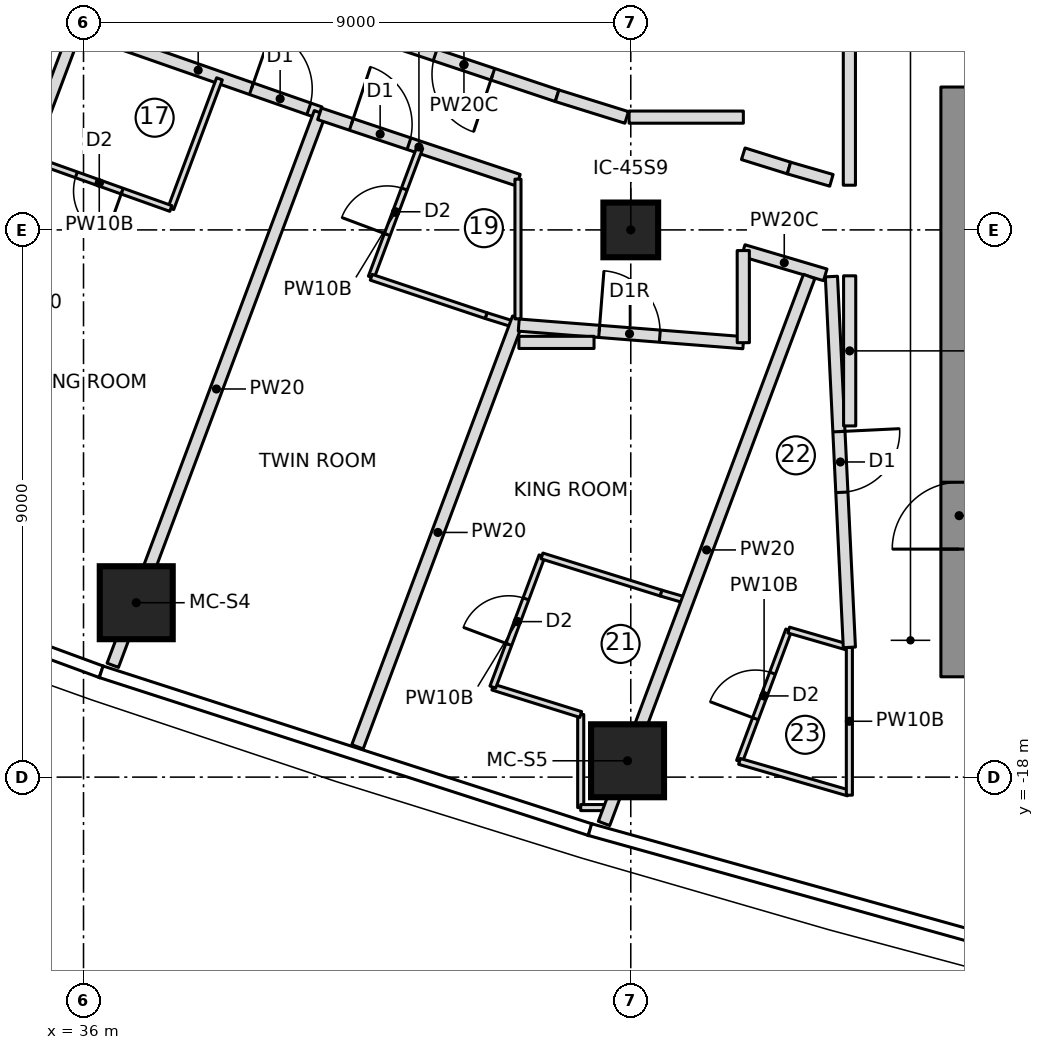
"""IFC4 building model, lengths in metres.
Left out: names, types, materials, properties, quantities, classifications, styles, units other than length and angle.
Written with IfcOpenShell. Run it as: python <this file> out.ifc"""

import sys

from ifc_helpers import new_model, si_unit, direction, frame, frame_2d, origin, origin_2d, place, context, subcontext, project, spatial, rectangle, extrude, element, fill, save


model = new_model("IFC4")
c1 = context("Model", 3, precision=1e-05, world=origin(), true_north=direction((0.0, 1.0)))
c2 = subcontext(c1, "Body", "Model", "MODEL_VIEW")
j1 = project(units=[si_unit("LENGTHUNIT", "METRE"), si_unit("PLANEANGLEUNIT", "RADIAN")], contexts=[c1])
p1 = place(None, origin())
s1 = spatial("IfcSite", under=j1, at=p1, CompositionType="ELEMENT")
p2 = place(p1, origin())
s2 = spatial("IfcBuilding", under=s1, at=p2, CompositionType="ELEMENT")
p3 = place(p2, frame((0.0, 0.0, 249.2)))
s3 = spatial("IfcBuildingStorey", under=s2, at=p3, CompositionType="ELEMENT", Elevation=249.2)
p4 = place(p3, frame((50.4, -16.35, 0.0), z_axis=(0.0, 0.0, 1.0), x_axis=(0.0, 1.0, 0.0)))
e1 = element("IfcWall", 1, at=p4, inside=s3, PredefinedType="SHEAR", context=c2, shape_type="SweptSolid", body=[
    extrude(rectangle(XDim=9.7, YDim=0.6, at=frame_2d((4.85, 0.0))), origin(), (0.0, 0.0, 1.0), 3.55),
])
p5 = place(p4, frame((2.1, 0.0, 0.0)))
e2 = element("IfcOpeningElement", 2, at=p5, cuts=e1, PredefinedType="OPENING", context=c2, shape_type="SweptSolid", body=[
    extrude(rectangle(XDim=1.1, YDim=2.1, at=frame_2d((0.55, 1.05))), frame((0.0, 0.31, 0.0), z_axis=(0.0, -1.0, 0.0), x_axis=(1.0, 0.0, 0.0)), (0.0, 0.0, 1.0), 0.62),
])
for number, where, z_axis, x_axis in (
    (3, (36.867, -15.132, 0.0), (0.0, 0.0, 1.0), (1.0, 0.0, 0.0)),
    (4, (44.947, -17.731, 0.0), (0.0, 0.0, 1.0), (1.0, 0.0, 0.0)),
):
    element("IfcColumn", number, at=place(p3, frame(where, z_axis=z_axis, x_axis=x_axis)), inside=s3, PredefinedType="COLUMN", context=c2, shape_type="SweptSolid", body=[
        extrude(rectangle(XDim=1.2, YDim=1.2, at=origin_2d()), origin(), (0.0, 0.0, 1.0), 3.55),
    ])
p6 = place(p3, frame((45.0, -9.0, 0.0), z_axis=(0.0, 0.0, 1.0), x_axis=(1.0, 0.0, 0.0)))
e5 = element("IfcColumn", 5, at=p6, inside=s3, PredefinedType="COLUMN", context=c2, shape_type="SweptSolid", body=[
    extrude(rectangle(XDim=0.9, YDim=0.9, at=origin_2d()), origin(), (0.0, 0.0, 1.0), 3.55),
])
p7 = place(p3, frame((32.483, -14.738, 0.0), z_axis=(0.0, 0.0, 1.0), x_axis=(0.351117925717, 0.936331246002, 0.0)))
e6 = element("IfcWall", 6, at=p7, inside=s3, PredefinedType="PARTITIONING", context=c2, shape_type="SweptSolid", body=[
    extrude(rectangle(XDim=9.701, YDim=0.2, at=frame_2d((4.851, 0.0))), origin(), (0.0, 0.0, 1.0), 3.25),
])
p8 = place(p3, frame((35.882, -5.673, 0.0), z_axis=(0.0, 0.0, 1.0), x_axis=(0.944107376821, -0.329638075823, 0.0)))
e7 = element("IfcWall", 7, at=p8, inside=s3, PredefinedType="PARTITIONING", context=c2, shape_type="SweptSolid", body=[
    extrude(rectangle(XDim=4.245, YDim=0.2, at=frame_2d((2.122, 0.0))), origin(), (0.0, 0.0, 1.0), 3.25),
])
p9 = place(p8, frame((3.05, 0.0, 0.0)))
e8 = element("IfcOpeningElement", 8, at=p9, cuts=e7, PredefinedType="OPENING", context=c2, shape_type="SweptSolid", body=[
    extrude(rectangle(XDim=1.0, YDim=2.1, at=frame_2d((0.5, 1.05))), frame((0.0, 0.11, 0.0), z_axis=(0.0, -1.0, 0.0), x_axis=(1.0, 0.0, 0.0)), (0.0, 0.0, 1.0), 0.22),
])
p10 = place(p3, frame((38.236, -6.516, 0.0), z_axis=(0.0, 0.0, 1.0), x_axis=(-0.351229183496, -0.936289517543, 0.0)))
e9 = element("IfcWall", 9, at=p10, inside=s3, PredefinedType="PARTITIONING", context=c2, shape_type="SweptSolid", body=[
    extrude(rectangle(XDim=2.277, YDim=0.1, at=frame_2d((1.139, 0.0))), origin(), (0.0, 0.0, 1.0), 3.25),
])
p11 = place(p3, frame((37.436, -8.648, 0.0), z_axis=(0.0, 0.0, 1.0), x_axis=(-0.941896455552, 0.335903359641, 0.0)))
e10 = element("IfcWall", 10, at=p11, inside=s3, PredefinedType="PARTITIONING", context=c2, shape_type="SweptSolid", body=[
    extrude(rectangle(XDim=2.5, YDim=0.1, at=frame_2d((1.25, 0.0))), origin(), (0.0, 0.0, 1.0), 3.25),
])
p12 = place(p11, frame((0.85, 0.0, 0.0)))
e11 = element("IfcOpeningElement", 11, at=p12, cuts=e10, PredefinedType="OPENING", context=c2, shape_type="SweptSolid", body=[
    extrude(rectangle(XDim=0.8, YDim=2.1, at=frame_2d((0.4, 1.05))), frame((0.0, 0.06, 0.0), z_axis=(0.0, -1.0, 0.0), x_axis=(1.0, 0.0, 0.0)), (0.0, 0.0, 1.0), 0.12),
])
p13 = place(p3, frame((36.481, -16.161, 0.0), z_axis=(0.0, 0.0, 1.0), x_axis=(0.35112895446, 0.936327110224, 0.0)))
e12 = element("IfcWall", 12, at=p13, inside=s3, PredefinedType="PARTITIONING", context=c2, shape_type="SweptSolid", body=[
    extrude(rectangle(XDim=9.706, YDim=0.2, at=frame_2d((4.853, 0.0))), origin(), (0.0, 0.0, 1.0), 3.25),
])
p14 = place(p3, frame((39.882, -7.091, 0.0), z_axis=(0.0, 0.0, 1.0), x_axis=(0.948477584784, -0.316844238013, 0.0)))
e13 = element("IfcWall", 13, at=p14, inside=s3, PredefinedType="PARTITIONING", context=c2, shape_type="SweptSolid", body=[
    extrude(rectangle(XDim=3.445, YDim=0.2, at=frame_2d((1.723, 0.0))), origin(), (0.0, 0.0, 1.0), 3.25),
])
p15 = place(p14, frame((0.55, 0.0, 0.0)))
e14 = element("IfcOpeningElement", 14, at=p15, cuts=e13, PredefinedType="OPENING", context=c2, shape_type="SweptSolid", body=[
    extrude(rectangle(XDim=1.0, YDim=2.1, at=frame_2d((0.5, 1.05))), frame((0.0, 0.11, 0.0), z_axis=(0.0, -1.0, 0.0), x_axis=(1.0, 0.0, 0.0)), (0.0, 0.0, 1.0), 0.22),
])
p16 = place(p3, frame((40.732, -9.779, 0.0), z_axis=(0.0, 0.0, 1.0), x_axis=(0.351146927505, 0.936320370014, 0.0)))
e15 = element("IfcWall", 15, at=p16, inside=s3, PredefinedType="PARTITIONING", context=c2, shape_type="SweptSolid", body=[
    extrude(rectangle(XDim=2.278, YDim=0.1, at=frame_2d((1.139, 0.0))), origin(), (0.0, 0.0, 1.0), 3.25),
])
p17 = place(p16, frame((0.75, 0.0, 0.0)))
e16 = element("IfcOpeningElement", 16, at=p17, cuts=e15, PredefinedType="OPENING", context=c2, shape_type="SweptSolid", body=[
    extrude(rectangle(XDim=0.8, YDim=2.1, at=frame_2d((0.4, 1.05))), frame((0.0, 0.06, 0.0), z_axis=(0.0, -1.0, 0.0), x_axis=(1.0, 0.0, 0.0)), (0.0, 0.0, 1.0), 0.12),
])
p18 = place(p3, frame((43.108, -10.562, 0.0), z_axis=(0.0, 0.0, 1.0), x_axis=(-0.954624465478, 0.297812239356, 0.0)))
e17 = element("IfcWall", 17, at=p18, inside=s3, PredefinedType="PARTITIONING", context=c2, shape_type="SweptSolid", body=[
    extrude(rectangle(XDim=0.511, YDim=0.1, at=frame_2d((0.255, 0.0))), origin(), (0.0, 0.0, 1.0), 3.25),
])
p19 = place(p3, frame((42.621, -10.409, 0.0), z_axis=(0.0, 0.0, 1.0), x_axis=(-0.948499248693, 0.316779379426, 0.0)))
e18 = element("IfcWall", 18, at=p19, inside=s3, PredefinedType="PARTITIONING", context=c2, shape_type="SweptSolid", body=[
    extrude(rectangle(XDim=1.991, YDim=0.1, at=frame_2d((0.996, 0.0))), origin(), (0.0, 0.0, 1.0), 3.25),
])
p20 = place(p3, frame((40.506, -17.501, 0.0), z_axis=(0.0, 0.0, 1.0), x_axis=(0.351119888923, 0.936330509811, 0.0)))
e19 = element("IfcWall", 19, at=p20, inside=s3, PredefinedType="PARTITIONING", context=c2, shape_type="SweptSolid", body=[
    extrude(rectangle(XDim=7.531, YDim=0.2, at=frame_2d((3.766, 0.0))), origin(), (0.0, 0.0, 1.0), 3.25),
])
p21 = place(p3, frame((46.85, -9.34, 0.0), z_axis=(0.0, 0.0, 1.0), x_axis=(0.958866391875, -0.283857785753, 0.0)))
e20 = element("IfcWall", 20, at=p21, inside=s3, PredefinedType="PARTITIONING", context=c2, shape_type="SweptSolid", body=[
    extrude(rectangle(XDim=1.406, YDim=0.2, at=frame_2d((0.703, 0.0))), origin(), (0.0, 0.0, 1.0), 3.25),
])
p22 = place(p3, frame((44.177, -18.501, 0.0), z_axis=(0.0, 0.0, 1.0), x_axis=(0.0, 1.0, 0.0)))
e21 = element("IfcWall", 21, at=p22, inside=s3, PredefinedType="PARTITIONING", context=c2, shape_type="SweptSolid", body=[
    extrude(rectangle(XDim=1.531, YDim=0.1, at=frame_2d((0.766, 0.0))), origin(), (0.0, 0.0, 1.0), 3.25),
])
p23 = place(p3, frame((44.177, -16.97, 0.0), z_axis=(0.0, 0.0, 1.0), x_axis=(-0.954631901927, 0.297788401091, 0.0)))
e22 = element("IfcWall", 22, at=p23, inside=s3, PredefinedType="PARTITIONING", context=c2, shape_type="SweptSolid", body=[
    extrude(rectangle(XDim=1.514, YDim=0.1, at=frame_2d((0.757, 0.0))), origin(), (0.0, 0.0, 1.0), 3.25),
])
p24 = place(p3, frame((42.731, -16.519, 0.0), z_axis=(0.0, 0.0, 1.0), x_axis=(0.351111827312, 0.936333532841, 0.0)))
e23 = element("IfcWall", 23, at=p24, inside=s3, PredefinedType="PARTITIONING", context=c2, shape_type="SweptSolid", body=[
    extrude(rectangle(XDim=2.304, YDim=0.1, at=frame_2d((1.152, 0.0))), origin(), (0.0, 0.0, 1.0), 3.25),
])
p25 = place(p24, frame((0.75, 0.0, 0.0)))
e24 = element("IfcOpeningElement", 24, at=p25, cuts=e23, PredefinedType="OPENING", context=c2, shape_type="SweptSolid", body=[
    extrude(rectangle(XDim=0.8, YDim=2.1, at=frame_2d((0.4, 1.05))), frame((0.0, 0.06, 0.0), z_axis=(0.0, -1.0, 0.0), x_axis=(1.0, 0.0, 0.0)), (0.0, 0.0, 1.0), 0.12),
])
p26 = place(p3, frame((43.54, -14.362, 0.0), z_axis=(0.0, 0.0, 1.0), x_axis=(0.954642821531, -0.297753393432, 0.0)))
e25 = element("IfcWall", 25, at=p26, inside=s3, PredefinedType="PARTITIONING", context=c2, shape_type="SweptSolid", body=[
    extrude(rectangle(XDim=2.052, YDim=0.1, at=frame_2d((1.026, 0.0))), origin(), (0.0, 0.0, 1.0), 3.25),
])
p27 = place(p3, frame((45.499, -14.973, 0.0), z_axis=(0.0, 0.0, 1.0), x_axis=(0.960560469191, -0.278071186978, 0.0)))
e26 = element("IfcWall", 26, at=p27, inside=s3, PredefinedType="PARTITIONING", context=c2, shape_type="SweptSolid", body=[
    extrude(rectangle(XDim=0.452, YDim=0.1, at=frame_2d((0.226, 0.0))), origin(), (0.0, 0.0, 1.0), 3.25),
])
p28 = place(p3, frame((44.658, -18.501, 0.0), z_axis=(0.0, 0.0, 1.0), x_axis=(-1.0, 0.0, 0.0)))
e27 = element("IfcWall", 27, at=p28, inside=s3, PredefinedType="PARTITIONING", context=c2, shape_type="SweptSolid", body=[
    extrude(rectangle(XDim=0.481, YDim=0.1, at=frame_2d((0.241, 0.0))), origin(), (0.0, 0.0, 1.0), 3.25),
])
p29 = place(p3, frame((44.56, -18.762, 0.0), z_axis=(0.0, 0.0, 1.0), x_axis=(0.35112901071, 0.936327089129, 0.0)))
e28 = element("IfcWall", 28, at=p29, inside=s3, PredefinedType="PARTITIONING", context=c2, shape_type="SweptSolid", body=[
    extrude(rectangle(XDim=9.608, YDim=0.2, at=frame_2d((4.804, 0.0))), origin(), (0.0, 0.0, 1.0), 3.25),
])
p30 = place(p3, frame((46.788, -17.741, 0.0), z_axis=(0.0, 0.0, 1.0), x_axis=(0.351158236187, 0.936316128857, 0.0)))
e29 = element("IfcWall", 29, at=p30, inside=s3, PredefinedType="PARTITIONING", context=c2, shape_type="SweptSolid", body=[
    extrude(rectangle(XDim=2.307, YDim=0.1, at=frame_2d((1.153, 0.0))), origin(), (0.0, 0.0, 1.0), 3.25),
])
p31 = place(p30, frame((0.75, 0.0, 0.0)))
e30 = element("IfcOpeningElement", 30, at=p31, cuts=e29, PredefinedType="OPENING", context=c2, shape_type="SweptSolid", body=[
    extrude(rectangle(XDim=0.8, YDim=2.1, at=frame_2d((0.4, 1.05))), frame((0.0, 0.06, 0.0), z_axis=(0.0, -1.0, 0.0), x_axis=(1.0, 0.0, 0.0)), (0.0, 0.0, 1.0), 0.12),
])
p32 = place(p3, frame((47.598, -15.582, 0.0), z_axis=(0.0, 0.0, 1.0), x_axis=(0.960468222897, -0.278389642057, 0.0)))
e31 = element("IfcWall", 31, at=p32, inside=s3, PredefinedType="PARTITIONING", context=c2, shape_type="SweptSolid", body=[
    extrude(rectangle(XDim=1.019, YDim=0.1, at=frame_2d((0.51, 0.0))), origin(), (0.0, 0.0, 1.0), 3.25),
])
p33 = place(p3, frame((48.578, -18.26, 0.0), z_axis=(0.0, 0.0, 1.0), x_axis=(-0.960473980386, 0.278369777458, 0.0)))
e32 = element("IfcWall", 32, at=p33, inside=s3, PredefinedType="PARTITIONING", context=c2, shape_type="SweptSolid", body=[
    extrude(rectangle(XDim=1.864, YDim=0.1, at=frame_2d((0.932, 0.0))), origin(), (0.0, 0.0, 1.0), 3.25),
])
p34 = place(p3, frame((43.788, -6.793, 0.0), z_axis=(0.0, 0.0, 1.0), x_axis=(-0.948486568618, 0.316817343515, 0.0)))
e33 = element("IfcWall", 33, at=p34, inside=s3, PredefinedType="PARTITIONING", context=c2, shape_type="SweptSolid", body=[
    extrude(rectangle(XDim=3.229, YDim=0.2, at=frame_2d((1.615, 0.0))), origin(), (0.0, 0.0, 1.0), 3.25),
])
p35 = place(p34, frame((1.115, 0.0, 0.0)))
e34 = element("IfcOpeningElement", 34, at=p35, cuts=e33, PredefinedType="OPENING", context=c2, shape_type="SweptSolid", body=[
    extrude(rectangle(XDim=1.0, YDim=2.1, at=frame_2d((0.5, 1.05))), frame((0.0, 0.11, 0.0), z_axis=(0.0, -1.0, 0.0), x_axis=(1.0, 0.0, 0.0)), (0.0, 0.0, 1.0), 0.22),
])
p36 = place(p3, frame((47.602, -7.982, 0.0), z_axis=(0.0, 0.0, 1.0), x_axis=(-0.95461224237, 0.297851417181, 0.0)))
e35 = element("IfcWall", 35, at=p36, inside=s3, PredefinedType="PARTITIONING", context=c2, shape_type="SweptSolid", body=[
    extrude(rectangle(XDim=0.788, YDim=0.2, at=frame_2d((0.394, 0.0))), origin(), (0.0, 0.0, 1.0), 3.25),
])
p37 = place(p3, frame((44.933, -7.15, 0.0), z_axis=(0.0, 0.0, 1.0), x_axis=(-0.954693570678, 0.29759063511, 0.0)))
e36 = element("IfcWall", 36, at=p37, inside=s3, PredefinedType="PARTITIONING", context=c2, shape_type="SweptSolid", body=[
    extrude(rectangle(XDim=1.198, YDim=0.2, at=frame_2d((0.599, 0.0))), origin(), (0.0, 0.0, 1.0), 3.25),
])
p38 = place(p3, frame((43.145, -8.165, 0.0), z_axis=(0.0, 0.0, 1.0), x_axis=(0.0, -1.0, 0.0)))
e37 = element("IfcWall", 37, at=p38, inside=s3, PredefinedType="PARTITIONING", context=c2, shape_type="SweptSolid", body=[
    extrude(rectangle(XDim=2.298, YDim=0.1, at=frame_2d((1.149, 0.0))), origin(), (0.0, 0.0, 1.0), 3.25),
])
p39 = place(p3, frame((48.595, -15.866, 0.0), z_axis=(0.0, 0.0, 1.0), x_axis=(0.0, -1.0, 0.0)))
e38 = element("IfcWall", 38, at=p39, inside=s3, PredefinedType="PARTITIONING", context=c2, shape_type="SweptSolid", body=[
    extrude(rectangle(XDim=2.431, YDim=0.1, at=frame_2d((1.215, 0.0))), origin(), (0.0, 0.0, 1.0), 3.25),
])
p40 = place(p3, frame((48.3, -8.185, 0.0), z_axis=(0.0, 0.0, 1.0), x_axis=(-0.960439023181, 0.278490363839, 0.0)))
e39 = element("IfcWall", 39, at=p40, inside=s3, PredefinedType="PARTITIONING", context=c2, shape_type="SweptSolid", body=[
    extrude(rectangle(XDim=0.727, YDim=0.2, at=frame_2d((0.363, 0.0))), origin(), (0.0, 0.0, 1.0), 3.25),
])
p41 = place(p3, frame((43.158, -10.565, 0.0), z_axis=(0.0, 0.0, 1.0), x_axis=(0.996940593543, -0.078162989617, 0.0)))
e40 = element("IfcWall", 40, at=p41, inside=s3, PredefinedType="PARTITIONING", context=c2, shape_type="SweptSolid", body=[
    extrude(rectangle(XDim=3.704, YDim=0.2, at=frame_2d((1.852, 0.0))), origin(), (0.0, 0.0, 1.0), 3.25),
])
p42 = place(p41, frame((1.327, 0.0, 0.0)))
e41 = element("IfcOpeningElement", 41, at=p42, cuts=e40, PredefinedType="OPENING", context=c2, shape_type="SweptSolid", body=[
    extrude(rectangle(XDim=1.0, YDim=2.1, at=frame_2d((0.5, 1.05))), frame((0.0, 0.11, 0.0), z_axis=(0.0, -1.0, 0.0), x_axis=(1.0, 0.0, 0.0)), (0.0, 0.0, 1.0), 0.22),
])
p43 = place(p3, frame((48.3, -9.767, 0.0), z_axis=(0.0, 0.0, 1.0), x_axis=(0.048302241024, -0.998832765538, 0.0)))
e42 = element("IfcWall", 42, at=p43, inside=s3, PredefinedType="PARTITIONING", context=c2, shape_type="SweptSolid", body=[
    extrude(rectangle(XDim=6.106, YDim=0.2, at=frame_2d((3.053, 0.0))), origin(), (0.0, 0.0, 1.0), 3.25),
])
p44 = place(p43, frame((2.553, 0.0, 0.0)))
e43 = element("IfcOpeningElement", 43, at=p44, cuts=e42, PredefinedType="OPENING", context=c2, shape_type="SweptSolid", body=[
    extrude(rectangle(XDim=1.0, YDim=2.1, at=frame_2d((0.5, 1.05))), frame((0.0, 0.11, 0.0), z_axis=(0.0, -1.0, 0.0), x_axis=(1.0, 0.0, 0.0)), (0.0, 0.0, 1.0), 0.22),
])
p45 = place(p3, frame((48.595, 8.265, 0.0), z_axis=(0.0, 0.0, 1.0), x_axis=(0.0, -1.0, 0.0)))
e44 = element("IfcWall", 44, at=p45, inside=s3, PredefinedType="PARTITIONING", context=c2, shape_type="SweptSolid", body=[
    extrude(rectangle(XDim=16.53, YDim=0.2, at=frame_2d((8.265, 0.0))), origin(), (0.0, 0.0, 1.0), 3.25),
])
p46 = place(p3, frame((46.852, -7.145, 0.0), z_axis=(0.0, 0.0, 1.0), x_axis=(-0.99999999156, 0.000129920747, 0.0)))
e45 = element("IfcWall", 45, at=p46, inside=s3, PredefinedType="PARTITIONING", context=c2, shape_type="SweptSolid", body=[
    extrude(rectangle(XDim=1.879, YDim=0.2, at=frame_2d((0.939, 0.0))), origin(), (0.0, 0.0, 1.0), 3.25),
])
p47 = place(p3, frame((46.851, -10.855, 0.0), z_axis=(0.0, 0.0, 1.0), x_axis=(-0.000644641284, 0.999999792219, 0.0)))
e46 = element("IfcWall", 46, at=p47, inside=s3, PredefinedType="PARTITIONING", context=c2, shape_type="SweptSolid", body=[
    extrude(rectangle(XDim=1.515, YDim=0.2, at=frame_2d((0.757, 0.0))), origin(), (0.0, 0.0, 1.0), 3.25),
])
p48 = place(p3, frame((44.396, -10.85, 0.0), z_axis=(0.0, 0.0, 1.0), x_axis=(-1.0, 0.0, 0.0)))
e47 = element("IfcWall", 47, at=p48, inside=s3, PredefinedType="PARTITIONING", context=c2, shape_type="SweptSolid", body=[
    extrude(rectangle(XDim=1.236, YDim=0.2, at=frame_2d((0.618, 0.0))), origin(), (0.0, 0.0, 1.0), 3.25),
])
p49 = place(p3, frame((48.6, -12.224, 0.0), z_axis=(0.0, 0.0, 1.0), x_axis=(0.0, 1.0, 0.0)))
e48 = element("IfcWall", 48, at=p49, inside=s3, PredefinedType="PARTITIONING", context=c2, shape_type="SweptSolid", body=[
    extrude(rectangle(XDim=2.469, YDim=0.2, at=frame_2d((1.234, 0.0))), origin(), (0.0, 0.0, 1.0), 3.25),
])
p50 = place(p12, origin())
e49 = element("IfcDoor", 49, at=p50, inside=s3, OperationType="SINGLE_SWING_LEFT", PredefinedType="DOOR", context=c2, shape_type="SweptSolid", body=[
    extrude(rectangle(XDim=0.8, YDim=2.1, at=frame_2d((0.4, 1.05))), frame((0.0, 0.025, 0.0), z_axis=(0.0, -1.0, 0.0), x_axis=(1.0, 0.0, 0.0)), (0.0, 0.0, 1.0), 0.05),
])
fill(e11, e49)
p51 = place(p9, origin())
e50 = element("IfcDoor", 50, at=p51, inside=s3, OperationType="SINGLE_SWING_LEFT", PredefinedType="DOOR", context=c2, shape_type="SweptSolid", body=[
    extrude(rectangle(XDim=1.0, YDim=2.1, at=frame_2d((0.5, 1.05))), frame((0.0, 0.025, 0.0), z_axis=(0.0, -1.0, 0.0), x_axis=(1.0, 0.0, 0.0)), (0.0, 0.0, 1.0), 0.05),
])
fill(e8, e50)
p52 = place(p17, origin())
e51 = element("IfcDoor", 51, at=p52, inside=s3, OperationType="SINGLE_SWING_LEFT", PredefinedType="DOOR", context=c2, shape_type="SweptSolid", body=[
    extrude(rectangle(XDim=0.8, YDim=2.1, at=frame_2d((0.4, 1.05))), frame((0.0, 0.025, 0.0), z_axis=(0.0, -1.0, 0.0), x_axis=(1.0, 0.0, 0.0)), (0.0, 0.0, 1.0), 0.05),
])
fill(e16, e51)
p53 = place(p15, origin())
e52 = element("IfcDoor", 52, at=p53, inside=s3, OperationType="SINGLE_SWING_LEFT", PredefinedType="DOOR", context=c2, shape_type="SweptSolid", body=[
    extrude(rectangle(XDim=1.0, YDim=2.1, at=frame_2d((0.5, 1.05))), frame((0.0, 0.025, 0.0), z_axis=(0.0, -1.0, 0.0), x_axis=(1.0, 0.0, 0.0)), (0.0, 0.0, 1.0), 0.05),
])
fill(e14, e52)
p54 = place(p25, origin())
e53 = element("IfcDoor", 53, at=p54, inside=s3, OperationType="SINGLE_SWING_LEFT", PredefinedType="DOOR", context=c2, shape_type="SweptSolid", body=[
    extrude(rectangle(XDim=0.8, YDim=2.1, at=frame_2d((0.4, 1.05))), frame((0.0, 0.025, 0.0), z_axis=(0.0, -1.0, 0.0), x_axis=(1.0, 0.0, 0.0)), (0.0, 0.0, 1.0), 0.05),
])
fill(e24, e53)
p55 = place(p31, origin())
e54 = element("IfcDoor", 54, at=p55, inside=s3, OperationType="SINGLE_SWING_LEFT", PredefinedType="DOOR", context=c2, shape_type="SweptSolid", body=[
    extrude(rectangle(XDim=0.8, YDim=2.1, at=frame_2d((0.4, 1.05))), frame((0.0, 0.025, 0.0), z_axis=(0.0, -1.0, 0.0), x_axis=(1.0, 0.0, 0.0)), (0.0, 0.0, 1.0), 0.05),
])
fill(e30, e54)
p56 = place(p35, origin())
e55 = element("IfcDoor", 55, at=p56, inside=s3, OperationType="SINGLE_SWING_LEFT", PredefinedType="DOOR", context=c2, shape_type="SweptSolid", body=[
    extrude(rectangle(XDim=1.0, YDim=2.1, at=frame_2d((0.5, 1.05))), frame((0.0, 0.025, 0.0), z_axis=(0.0, -1.0, 0.0), x_axis=(1.0, 0.0, 0.0)), (0.0, 0.0, 1.0), 0.05),
])
fill(e34, e55)
p57 = place(p42, origin())
e56 = element("IfcDoor", 56, at=p57, inside=s3, OperationType="SINGLE_SWING_RIGHT", PredefinedType="DOOR", context=c2, shape_type="SweptSolid", body=[
    extrude(rectangle(XDim=1.0, YDim=2.1, at=frame_2d((0.5, 1.05))), frame((0.0, 0.025, 0.0), z_axis=(0.0, -1.0, 0.0), x_axis=(1.0, 0.0, 0.0)), (0.0, 0.0, 1.0), 0.05),
])
fill(e41, e56)
p58 = place(p44, origin())
e57 = element("IfcDoor", 57, at=p58, inside=s3, OperationType="SINGLE_SWING_LEFT", PredefinedType="DOOR", context=c2, shape_type="SweptSolid", body=[
    extrude(rectangle(XDim=1.0, YDim=2.1, at=frame_2d((0.5, 1.05))), frame((0.0, 0.025, 0.0), z_axis=(0.0, -1.0, 0.0), x_axis=(1.0, 0.0, 0.0)), (0.0, 0.0, 1.0), 0.05),
])
fill(e43, e57)
p59 = place(p5, origin())
e58 = element("IfcDoor", 58, at=p59, inside=s3, OperationType="SINGLE_SWING_RIGHT", PredefinedType="DOOR", context=c2, shape_type="SweptSolid", body=[
    extrude(rectangle(XDim=1.1, YDim=2.1, at=frame_2d((0.55, 1.05))), frame((0.0, 0.025, 0.0), z_axis=(0.0, -1.0, 0.0), x_axis=(1.0, 0.0, 0.0)), (0.0, 0.0, 1.0), 0.05),
])
fill(e2, e58)
save(model, sys.argv[1])
